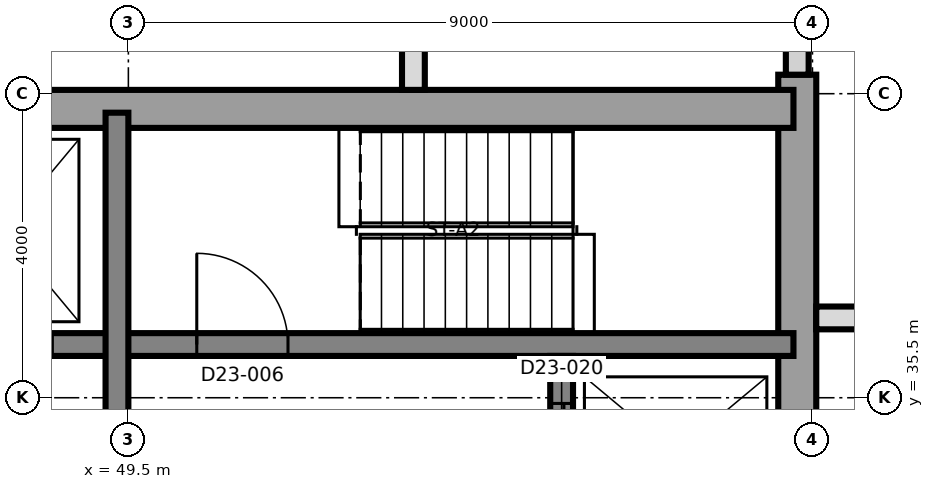
"""IFC4 building model, lengths in metres.
Left out: names, types, materials, properties, quantities, classifications, styles, units other than length and angle.
Written with IfcOpenShell. Run it as: python <this file> out.ifc"""

import sys

from ifc_helpers import new_model, si_unit, direction, frame, frame_2d, origin, place, context, subcontext, project, spatial, rectangle, extrude, element, fill, save


model = new_model("IFC4")
c1 = context("Model", 3, precision=1e-05, world=origin(), true_north=direction((0.0, 1.0)))
c2 = subcontext(c1, "Body", "Model", "MODEL_VIEW")
j1 = project(units=[si_unit("LENGTHUNIT", "METRE"), si_unit("PLANEANGLEUNIT", "RADIAN")], contexts=[c1])
p1 = place(None, origin())
s1 = spatial("IfcSite", under=j1, at=p1, CompositionType="ELEMENT")
p2 = place(p1, origin())
s2 = spatial("IfcBuilding", under=s1, at=p2, CompositionType="ELEMENT")
p3 = place(p2, frame((0.0, 0.0, 206.9)))
s3 = spatial("IfcBuildingStorey", under=s2, at=p3, CompositionType="ELEMENT", Elevation=206.9)
p4 = place(p3, frame((58.3, 21.25, 0.0), z_axis=(0.0, 0.0, 1.0), x_axis=(0.0, 1.0, 0.0)))
e1 = element("IfcWall", 1, at=p4, inside=s3, PredefinedType="SHEAR", context=c2, shape_type="SweptSolid", body=[
    extrude(rectangle(XDim=18.5, YDim=0.5, at=frame_2d((9.25, 0.0))), origin(), (0.0, 0.0, 1.0), 3.7),
])
p5 = place(p4, frame((10.15, 0.0, 0.0)))
e2 = element("IfcOpeningElement", 2, at=p5, cuts=e1, PredefinedType="OPENING", context=c2, shape_type="SweptSolid", body=[
    extrude(rectangle(XDim=1.2, YDim=2.1, at=frame_2d((0.6, 1.05))), frame((0.0, 0.26, 0.0), z_axis=(0.0, -1.0, 0.0), x_axis=(1.0, 0.0, 0.0)), (0.0, 0.0, 1.0), 0.52),
])
p6 = place(p3, frame((31.25, 39.3, 0.0), z_axis=(0.0, 0.0, 1.0), x_axis=(1.0, 0.0, 0.0)))
e3 = element("IfcWall", 3, at=p6, inside=s3, PredefinedType="SHEAR", context=c2, shape_type="SweptSolid", body=[
    extrude(rectangle(XDim=27.0, YDim=0.5, at=frame_2d((13.5, 0.0))), origin(), (0.0, 0.0, 1.0), 3.7),
])
p7 = place(p6, frame((10.45, 0.0, 0.0)))
e4 = element("IfcOpeningElement", 4, at=p7, cuts=e3, PredefinedType="OPENING", context=c2, shape_type="SweptSolid", body=[
    extrude(rectangle(XDim=1.2, YDim=2.1, at=frame_2d((0.6, 1.05))), frame((0.0, 0.26, 0.0), z_axis=(0.0, -1.0, 0.0), x_axis=(1.0, 0.0, 0.0)), (0.0, 0.0, 1.0), 0.52),
])
p8 = place(p3, frame((43.5, 36.2, 0.0), z_axis=(0.0, 0.0, 1.0), x_axis=(1.0, 0.0, 0.0)))
e5 = element("IfcWall", 5, at=p8, inside=s3, PredefinedType="SHEAR", context=c2, shape_type="SweptSolid", body=[
    extrude(rectangle(XDim=14.75, YDim=0.3, at=frame_2d((7.375, 0.0))), origin(), (0.0, 0.0, 1.0), 3.7),
])
p9 = place(p8, frame((6.9, 0.0, 0.0)))
e6 = element("IfcOpeningElement", 6, at=p9, cuts=e5, PredefinedType="OPENING", context=c2, shape_type="SweptSolid", body=[
    extrude(rectangle(XDim=1.2, YDim=2.1, at=frame_2d((0.6, 1.05))), frame((0.0, 0.16, 0.0), z_axis=(0.0, -1.0, 0.0), x_axis=(1.0, 0.0, 0.0)), (0.0, 0.0, 1.0), 0.32),
])
p10 = place(p8, frame((0.7, 0.0, 0.0)))
e7 = element("IfcOpeningElement", 7, at=p10, cuts=e5, PredefinedType="OPENING", context=c2, shape_type="SweptSolid", body=[
    extrude(rectangle(XDim=1.3, YDim=2.4, at=frame_2d((0.65, 1.2))), frame((0.0, 0.16, 0.0), z_axis=(0.0, -1.0, 0.0), x_axis=(1.0, 0.0, 0.0)), (0.0, 0.0, 1.0), 0.32),
])
p11 = place(p8, frame((3.7, 0.0, 0.0)))
e8 = element("IfcOpeningElement", 8, at=p11, cuts=e5, PredefinedType="OPENING", context=c2, shape_type="SweptSolid", body=[
    extrude(rectangle(XDim=1.3, YDim=2.4, at=frame_2d((0.65, 1.2))), frame((0.0, 0.16, 0.0), z_axis=(0.0, -1.0, 0.0), x_axis=(1.0, 0.0, 0.0)), (0.0, 0.0, 1.0), 0.32),
])
p12 = place(p3, frame((49.35, 33.5, 0.0), z_axis=(0.0, 0.0, 1.0), x_axis=(0.0, 1.0, 0.0)))
e9 = element("IfcWall", 9, at=p12, inside=s3, PredefinedType="SHEAR", context=c2, shape_type="SweptSolid", body=[
    extrude(rectangle(XDim=5.75, YDim=0.3, at=frame_2d((2.875, 0.0))), origin(), (0.0, 0.0, 1.0), 3.7),
])
p13 = place(p3, frame((55.2, 33.5, 0.0), z_axis=(0.0, 0.0, 1.0), x_axis=(0.0, 1.0, 0.0)))
e10 = element("IfcWall", 10, at=p13, inside=s3, PredefinedType="SHEAR", context=c2, shape_type="SweptSolid", body=[
    extrude(rectangle(XDim=2.55, YDim=0.3, at=frame_2d((1.275, 0.0))), origin(), (0.0, 0.0, 1.0), 3.7),
])
p14 = place(p13, frame((0.625, 0.0, 0.0)))
e11 = element("IfcOpeningElement", 11, at=p14, cuts=e10, PredefinedType="OPENING", context=c2, shape_type="SweptSolid", body=[
    extrude(rectangle(XDim=1.3, YDim=2.4, at=frame_2d((0.65, 1.2))), frame((0.0, 0.16, 0.0), z_axis=(0.0, -1.0, 0.0), x_axis=(1.0, 0.0, 0.0)), (0.0, 0.0, 1.0), 0.32),
])
p15 = place(p3, frame((58.55, 36.55, 0.0), z_axis=(0.0, 0.0, 1.0), x_axis=(1.0, 0.0, 0.0)))
e12 = element("IfcWall", 12, at=p15, inside=s3, PredefinedType="PARTITIONING", context=c2, shape_type="SweptSolid", body=[
    extrude(rectangle(XDim=2.65, YDim=0.3, at=frame_2d((1.325, 0.0))), origin(), (0.0, 0.0, 1.0), 3.4),
])
p16 = place(p15, frame((0.9, 0.0, 0.0)))
e13 = element("IfcOpeningElement", 13, at=p16, cuts=e12, PredefinedType="OPENING", context=c2, shape_type="SweptSolid", body=[
    extrude(rectangle(XDim=0.8, YDim=2.1, at=frame_2d((0.4, 1.05))), frame((0.0, 0.16, 0.0), z_axis=(0.0, -1.0, 0.0), x_axis=(1.0, 0.0, 0.0)), (0.0, 0.0, 1.0), 0.32),
])
p17 = place(p3, frame((53.25, 39.55, 0.0), z_axis=(0.0, 0.0, 1.0), x_axis=(0.0, 1.0, 0.0)))
e14 = element("IfcWall", 14, at=p17, inside=s3, PredefinedType="PARTITIONING", context=c2, shape_type="SweptSolid", body=[
    extrude(rectangle(XDim=1.271, YDim=0.3, at=frame_2d((0.635, 0.0))), origin(), (0.0, 0.0, 1.0), 3.4),
])
p18 = place(p3, frame((58.3, 39.75, 0.0), z_axis=(0.0, 0.0, 1.0), x_axis=(0.0, 1.0, 0.0)))
e15 = element("IfcWall", 15, at=p18, inside=s3, PredefinedType="PARTITIONING", context=c2, shape_type="SweptSolid", body=[
    extrude(rectangle(XDim=0.435, YDim=0.3, at=frame_2d((0.218, 0.0))), origin(), (0.0, 0.0, 1.0), 3.4),
])
p19 = place(p9, origin())
e16 = element("IfcDoor", 16, at=p19, inside=s3, OperationType="SINGLE_SWING_LEFT", PredefinedType="DOOR", context=c2, shape_type="SweptSolid", body=[
    extrude(rectangle(XDim=1.2, YDim=2.1, at=frame_2d((0.6, 1.05))), frame((0.0, 0.025, 0.0), z_axis=(0.0, -1.0, 0.0), x_axis=(1.0, 0.0, 0.0)), (0.0, 0.0, 1.0), 0.05),
])
fill(e6, e16)
p20 = place(p14, origin())
e17 = element("IfcDoor", 17, at=p20, inside=s3, OperationType="SLIDING_TO_LEFT", PredefinedType="DOOR", context=c2, shape_type="SweptSolid", body=[
    extrude(rectangle(XDim=1.3, YDim=2.4, at=frame_2d((0.65, 1.2))), frame((0.0, 0.025, 0.0), z_axis=(0.0, -1.0, 0.0), x_axis=(1.0, 0.0, 0.0)), (0.0, 0.0, 1.0), 0.05),
])
fill(e11, e17)
save(model, sys.argv[1])
